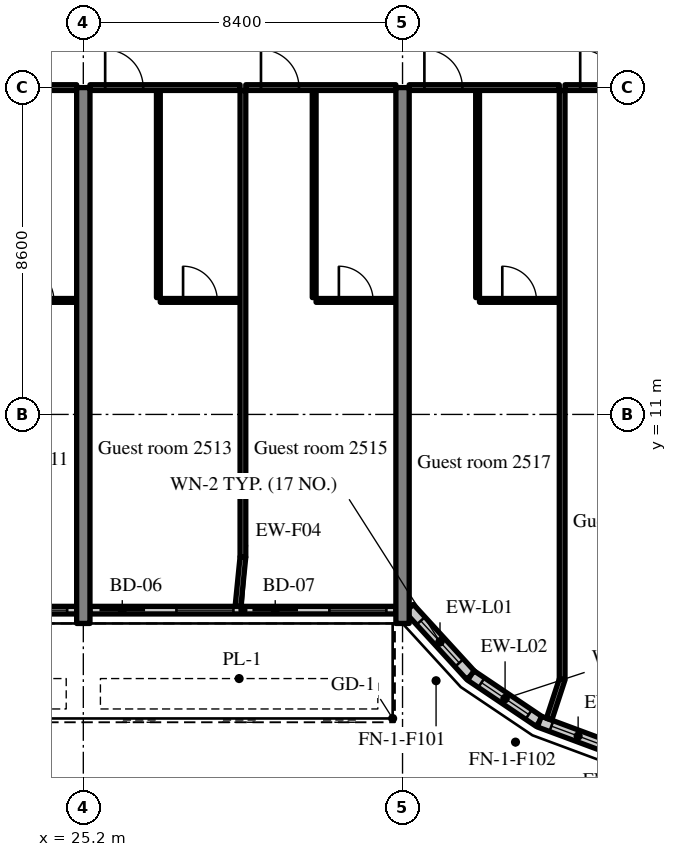
"""IFC4 building model, lengths in metres.
Left out: names, types, materials, properties, quantities, classifications, styles, units other than length and angle.
Written with IfcOpenShell. Run it as: python <this file> out.ifc"""

import sys

from ifc_helpers import new_model, si_unit, direction, frame, frame_2d, origin, place, context, subcontext, project, spatial, rectangle, extrude, source, transform, mapped, element, fill, save


model = new_model("IFC4")
c1 = context("Model", 3, precision=1e-05, world=origin(), true_north=direction((0.0, 1.0)))
c2 = subcontext(c1, "Body", "Model", "MODEL_VIEW")
j1 = project(units=[si_unit("LENGTHUNIT", "METRE"), si_unit("PLANEANGLEUNIT", "RADIAN")], contexts=[c1])
p1 = place(None, origin())
s1 = spatial("IfcSite", under=j1, at=p1, CompositionType="ELEMENT")
p2 = place(p1, origin())
s2 = spatial("IfcBuilding", under=s1, at=p2, CompositionType="ELEMENT")
p3 = place(p2, frame((0.0, 0.0, 106.6)))
s3 = spatial("IfcBuildingStorey", under=s2, at=p3, CompositionType="ELEMENT", Elevation=106.6)
m1 = source(origin(), c2, "Body", "SweptSolid", [
    extrude(rectangle(XDim=14.1, YDim=0.35, at=frame_2d((7.05, 0.0))), origin(), (0.0, 0.0, 1.0), 3.52),
])
for number, where, z_axis, x_axis in (
    (1, (25.2, 5.5, 0.0), (0.0, 0.0, 1.0), (0.0, 1.0, 0.0)),
    (2, (33.6, 5.5, 0.0), (0.0, 0.0, 1.0), (0.0, 1.0, 0.0)),
):
    element("IfcWall", number, at=place(p3, frame(where, z_axis=z_axis, x_axis=x_axis)), inside=s3, PredefinedType="SHEAR", context=c2, shape_type="MappedRepresentation", body=[
        mapped(m1, transform((0.0, 0.0, 0.0), scale=1.0)),
    ])
m2 = source(origin(), c2, "Body", "SweptSolid", [
    extrude(rectangle(XDim=8.05, YDim=0.2, at=frame_2d((4.025, 0.0))), origin(), (0.0, 0.0, 1.0), 2.82),
])
p4 = place(p3, frame((16.975, 5.85, 0.0), z_axis=(0.0, 0.0, 1.0), x_axis=(1.0, 0.0, 0.0)))
e3 = element("IfcWall", 3, at=p4, inside=s3, PredefinedType="SOLIDWALL", context=c2, shape_type="MappedRepresentation", body=[
    mapped(m2, transform((0.0, 0.0, 0.0), scale=1.0)),
])
m3 = source(origin(), c2, "Body", "SweptSolid", [
    extrude(rectangle(XDim=1.2, YDim=2.4, at=frame_2d((0.6, 1.2))), frame((0.0, 0.11, 0.0), z_axis=(0.0, -1.0, 0.0), x_axis=(1.0, 0.0, 0.0)), (0.0, 0.0, 1.0), 0.22),
])
p5 = place(p4, frame((0.25, 0.0, 0.0)))
e4 = element("IfcOpeningElement", 4, at=p5, cuts=e3, PredefinedType="OPENING", context=c2, shape_type="MappedRepresentation", body=[
    mapped(m3, transform((0.0, 0.0, 0.0), scale=1.0)),
])
m4 = source(origin(), c2, "Body", "SweptSolid", [
    extrude(rectangle(XDim=1.5, YDim=1.5, at=frame_2d((0.75, 0.75))), frame((0.0, 0.11, 0.0), z_axis=(0.0, -1.0, 0.0), x_axis=(1.0, 0.0, 0.0)), (0.0, 0.0, 1.0), 0.22),
])
p6 = place(p4, frame((2.275, 0.0, 0.9)))
e5 = element("IfcOpeningElement", 5, at=p6, cuts=e3, PredefinedType="OPENING", context=c2, shape_type="MappedRepresentation", body=[
    mapped(m4, transform((0.0, 0.0, 0.0), scale=1.0)),
])
p7 = place(p4, frame((4.275, 0.0, 0.0)))
e6 = element("IfcOpeningElement", 6, at=p7, cuts=e3, PredefinedType="OPENING", context=c2, shape_type="MappedRepresentation", body=[
    mapped(m3, transform((0.0, 0.0, 0.0), scale=1.0)),
])
p8 = place(p4, frame((6.3, 0.0, 0.9)))
e7 = element("IfcOpeningElement", 7, at=p8, cuts=e3, PredefinedType="OPENING", context=c2, shape_type="MappedRepresentation", body=[
    mapped(m4, transform((0.0, 0.0, 0.0), scale=1.0)),
])
m5 = source(origin(), c2, "Body", "SweptSolid", [
    extrude(rectangle(XDim=8.05, YDim=0.2, at=frame_2d((4.025, 0.0))), origin(), (0.0, 0.0, 1.0), 2.82),
])
p9 = place(p3, frame((25.375, 5.85, 0.0), z_axis=(0.0, 0.0, 1.0), x_axis=(1.0, 0.0, 0.0)))
e8 = element("IfcWall", 8, at=p9, inside=s3, PredefinedType="SOLIDWALL", context=c2, shape_type="MappedRepresentation", body=[
    mapped(m5, transform((0.0, 0.0, 0.0), scale=1.0)),
])
p10 = place(p9, frame((0.25, 0.0, 0.0)))
e9 = element("IfcOpeningElement", 9, at=p10, cuts=e8, PredefinedType="OPENING", context=c2, shape_type="MappedRepresentation", body=[
    mapped(m3, transform((0.0, 0.0, 0.0), scale=1.0)),
])
p11 = place(p9, frame((2.275, 0.0, 0.9)))
e10 = element("IfcOpeningElement", 10, at=p11, cuts=e8, PredefinedType="OPENING", context=c2, shape_type="MappedRepresentation", body=[
    mapped(m4, transform((0.0, 0.0, 0.0), scale=1.0)),
])
p12 = place(p9, frame((4.275, 0.0, 0.0)))
e11 = element("IfcOpeningElement", 11, at=p12, cuts=e8, PredefinedType="OPENING", context=c2, shape_type="MappedRepresentation", body=[
    mapped(m3, transform((0.0, 0.0, 0.0), scale=1.0)),
])
p13 = place(p9, frame((6.3, 0.0, 0.9)))
e12 = element("IfcOpeningElement", 12, at=p13, cuts=e8, PredefinedType="OPENING", context=c2, shape_type="MappedRepresentation", body=[
    mapped(m4, transform((0.0, 0.0, 0.0), scale=1.0)),
])
m6 = source(origin(), c2, "Body", "SweptSolid", [
    extrude(rectangle(XDim=2.398, YDim=0.3, at=frame_2d((1.199, 0.0))), origin(), (0.0, 0.0, 1.0), 3.52),
])
p14 = place(p3, frame((33.776, 5.9, 0.0), z_axis=(0.0, 0.0, 1.0), x_axis=(0.675374189419, -0.737475222815, 0.0)))
e13 = element("IfcWall", 13, at=p14, inside=s3, PredefinedType="SOLIDWALL", context=c2, shape_type="MappedRepresentation", body=[
    mapped(m6, transform((0.0, 0.0, 0.0), scale=1.0)),
])
m7 = source(origin(), c2, "Body", "SweptSolid", [
    extrude(rectangle(XDim=1.5, YDim=2.0, at=frame_2d((0.75, 1.0))), frame((0.0, 0.16, 0.0), z_axis=(0.0, -1.0, 0.0), x_axis=(1.0, 0.0, 0.0)), (0.0, 0.0, 1.0), 0.32),
])
p15 = place(p14, frame((0.449, 0.0, 0.9)))
e14 = element("IfcOpeningElement", 14, at=p15, cuts=e13, PredefinedType="OPENING", context=c2, shape_type="MappedRepresentation", body=[
    mapped(m7, transform((0.0, 0.0, 0.0), scale=1.0)),
])
m8 = source(origin(), c2, "Body", "SweptSolid", [
    extrude(rectangle(XDim=2.176, YDim=0.3, at=frame_2d((1.088, 0.0))), origin(), (0.0, 0.0, 1.0), 3.52),
])
p16 = place(p3, frame((35.396, 4.131, 0.0), z_axis=(0.0, 0.0, 1.0), x_axis=(0.829590746428, -0.558371913192, 0.0)))
e15 = element("IfcWall", 15, at=p16, inside=s3, PredefinedType="SOLIDWALL", context=c2, shape_type="MappedRepresentation", body=[
    mapped(m8, transform((0.0, 0.0, 0.0), scale=1.0)),
])
p17 = place(p16, frame((0.338, 0.0, 0.9)))
e16 = element("IfcOpeningElement", 16, at=p17, cuts=e15, PredefinedType="OPENING", context=c2, shape_type="MappedRepresentation", body=[
    mapped(m7, transform((0.0, 0.0, 0.0), scale=1.0)),
])
p18 = place(p3, frame((37.201, 2.917, 0.0), z_axis=(0.0, 0.0, 1.0), x_axis=(0.93754555999, -0.347862505801, 0.0)))
e17 = element("IfcWall", 17, at=p18, inside=s3, PredefinedType="SOLIDWALL", context=c2, shape_type="MappedRepresentation", body=[
    mapped(m8, transform((0.0, 0.0, 0.0), scale=1.0)),
])
p19 = place(p18, frame((0.338, 0.0, 0.9)))
e18 = element("IfcOpeningElement", 18, at=p19, cuts=e17, PredefinedType="OPENING", context=c2, shape_type="MappedRepresentation", body=[
    mapped(m7, transform((0.0, 0.0, 0.0), scale=1.0)),
])
m9 = source(origin(), c2, "Body", "SweptSolid", [
    extrude(rectangle(XDim=2.1, YDim=0.1, at=frame_2d((1.05, 0.0))), origin(), (0.0, 0.0, 1.0), 3.52),
])
p20 = place(p3, frame((22.925, 14.0, 0.0), z_axis=(0.0, 0.0, 1.0), x_axis=(1.0, 0.0, 0.0)))
e19 = element("IfcWall", 19, at=p20, inside=s3, PredefinedType="PARTITIONING", context=c2, shape_type="MappedRepresentation", body=[
    mapped(m9, transform((0.0, 0.0, 0.0), scale=1.0)),
])
m10 = source(origin(), c2, "Body", "SweptSolid", [
    extrude(rectangle(XDim=0.9, YDim=2.1, at=frame_2d((0.45, 1.05))), frame((0.0, 0.06, 0.0), z_axis=(0.0, -1.0, 0.0), x_axis=(1.0, 0.0, 0.0)), (0.0, 0.0, 1.0), 0.12),
])
p21 = place(p20, frame((0.6, 0.0, 0.0)))
e20 = element("IfcOpeningElement", 20, at=p21, cuts=e19, PredefinedType="OPENING", context=c2, shape_type="MappedRepresentation", body=[
    mapped(m10, transform((0.0, 0.0, 0.0), scale=1.0)),
])
m11 = source(origin(), c2, "Body", "SweptSolid", [
    extrude(rectangle(XDim=3.95, YDim=0.15, at=frame_2d((1.975, 0.0))), origin(), (0.0, 0.0, 1.0), 2.82),
])
p22 = place(p3, frame((21.075, 19.6, 0.0), z_axis=(0.0, 0.0, 1.0), x_axis=(1.0, 0.0, 0.0)))
e21 = element("IfcWall", 21, at=p22, inside=s3, PredefinedType="PARTITIONING", context=c2, shape_type="MappedRepresentation", body=[
    mapped(m11, transform((0.0, 0.0, 0.0), scale=1.0)),
])
m12 = source(origin(), c2, "Body", "SweptSolid", [
    extrude(rectangle(XDim=1.0, YDim=2.1, at=frame_2d((0.5, 1.05))), frame((0.0, 0.085, 0.0), z_axis=(0.0, -1.0, 0.0), x_axis=(1.0, 0.0, 0.0)), (0.0, 0.0, 1.0), 0.17),
])
p23 = place(p22, frame((0.4, 0.0, 0.0)))
e22 = element("IfcOpeningElement", 22, at=p23, cuts=e21, PredefinedType="OPENING", context=c2, shape_type="MappedRepresentation", body=[
    mapped(m12, transform((0.0, 0.0, 0.0), scale=1.0)),
])
m13 = source(origin(), c2, "Body", "SweptSolid", [
    extrude(rectangle(XDim=5.45, YDim=0.1, at=frame_2d((2.725, 0.0))), origin(), (0.0, 0.0, 1.0), 3.52),
])
p24 = place(p3, frame((27.175, 14.075, 0.0), z_axis=(0.0, 0.0, 1.0), x_axis=(0.0, 1.0, 0.0)))
e23 = element("IfcWall", 23, at=p24, inside=s3, PredefinedType="PARTITIONING", context=c2, shape_type="MappedRepresentation", body=[
    mapped(m13, transform((0.0, 0.0, 0.0), scale=1.0)),
])
p25 = place(p3, frame((27.225, 14.0, 0.0), z_axis=(0.0, 0.0, 1.0), x_axis=(1.0, 0.0, 0.0)))
e24 = element("IfcWall", 24, at=p25, inside=s3, PredefinedType="PARTITIONING", context=c2, shape_type="MappedRepresentation", body=[
    mapped(m9, transform((0.0, 0.0, 0.0), scale=1.0)),
])
p26 = place(p25, frame((0.6, 0.0, 0.0)))
e25 = element("IfcOpeningElement", 25, at=p26, cuts=e24, PredefinedType="OPENING", context=c2, shape_type="MappedRepresentation", body=[
    mapped(m10, transform((0.0, 0.0, 0.0), scale=1.0)),
])
p27 = place(p3, frame((25.375, 19.6, 0.0), z_axis=(0.0, 0.0, 1.0), x_axis=(1.0, 0.0, 0.0)))
e26 = element("IfcWall", 26, at=p27, inside=s3, PredefinedType="PARTITIONING", context=c2, shape_type="MappedRepresentation", body=[
    mapped(m11, transform((0.0, 0.0, 0.0), scale=1.0)),
])
p28 = place(p27, frame((0.4, 0.0, 0.0)))
e27 = element("IfcOpeningElement", 27, at=p28, cuts=e26, PredefinedType="OPENING", context=c2, shape_type="MappedRepresentation", body=[
    mapped(m12, transform((0.0, 0.0, 0.0), scale=1.0)),
])
p29 = place(p3, frame((31.275, 14.075, 0.0), z_axis=(0.0, 0.0, 1.0), x_axis=(0.0, 1.0, 0.0)))
e28 = element("IfcWall", 28, at=p29, inside=s3, PredefinedType="PARTITIONING", context=c2, shape_type="MappedRepresentation", body=[
    mapped(m13, transform((0.0, 0.0, 0.0), scale=1.0)),
])
m14 = source(origin(), c2, "Body", "SweptSolid", [
    extrude(rectangle(XDim=2.1, YDim=0.1, at=frame_2d((1.05, 0.0))), origin(), (0.0, 0.0, 1.0), 3.52),
])
p30 = place(p3, frame((31.325, 14.0, 0.0), z_axis=(0.0, 0.0, 1.0), x_axis=(1.0, 0.0, 0.0)))
e29 = element("IfcWall", 29, at=p30, inside=s3, PredefinedType="PARTITIONING", context=c2, shape_type="MappedRepresentation", body=[
    mapped(m14, transform((0.0, 0.0, 0.0), scale=1.0)),
])
p31 = place(p30, frame((0.6, 0.0, 0.0)))
e30 = element("IfcOpeningElement", 30, at=p31, cuts=e29, PredefinedType="OPENING", context=c2, shape_type="MappedRepresentation", body=[
    mapped(m10, transform((0.0, 0.0, 0.0), scale=1.0)),
])
p32 = place(p3, frame((29.475, 19.6, 0.0), z_axis=(0.0, 0.0, 1.0), x_axis=(1.0, 0.0, 0.0)))
e31 = element("IfcWall", 31, at=p32, inside=s3, PredefinedType="PARTITIONING", context=c2, shape_type="MappedRepresentation", body=[
    mapped(m11, transform((0.0, 0.0, 0.0), scale=1.0)),
])
p33 = place(p32, frame((0.4, 0.0, 0.0)))
e32 = element("IfcOpeningElement", 32, at=p33, cuts=e31, PredefinedType="OPENING", context=c2, shape_type="MappedRepresentation", body=[
    mapped(m12, transform((0.0, 0.0, 0.0), scale=1.0)),
])
m15 = source(origin(), c2, "Body", "SweptSolid", [
    extrude(rectangle(XDim=12.275, YDim=0.15, at=frame_2d((6.137, 0.0))), origin(), (0.0, 0.0, 1.0), 3.52),
])
p34 = place(p3, frame((29.4, 7.25, 0.0), z_axis=(0.0, 0.0, 1.0), x_axis=(0.0, 1.0, 0.0)))
e33 = element("IfcWall", 33, at=p34, inside=s3, PredefinedType="PARTITIONING", context=c2, shape_type="MappedRepresentation", body=[
    mapped(m15, transform((0.0, 0.0, 0.0), scale=1.0)),
])
p35 = place(p3, frame((35.575, 14.075, 0.0), z_axis=(0.0, 0.0, 1.0), x_axis=(0.0, 1.0, 0.0)))
e34 = element("IfcWall", 34, at=p35, inside=s3, PredefinedType="PARTITIONING", context=c2, shape_type="MappedRepresentation", body=[
    mapped(m13, transform((0.0, 0.0, 0.0), scale=1.0)),
])
p36 = place(p3, frame((35.625, 14.0, 0.0), z_axis=(0.0, 0.0, 1.0), x_axis=(1.0, 0.0, 0.0)))
e35 = element("IfcWall", 35, at=p36, inside=s3, PredefinedType="PARTITIONING", context=c2, shape_type="MappedRepresentation", body=[
    mapped(m14, transform((0.0, 0.0, 0.0), scale=1.0)),
])
p37 = place(p36, frame((0.6, 0.0, 0.0)))
e36 = element("IfcOpeningElement", 36, at=p37, cuts=e35, PredefinedType="OPENING", context=c2, shape_type="MappedRepresentation", body=[
    mapped(m10, transform((0.0, 0.0, 0.0), scale=1.0)),
])
m16 = source(origin(), c2, "Body", "SweptSolid", [
    extrude(rectangle(XDim=3.95, YDim=0.15, at=frame_2d((1.975, 0.0))), origin(), (0.0, 0.0, 1.0), 2.82),
])
p38 = place(p3, frame((33.775, 19.6, 0.0), z_axis=(0.0, 0.0, 1.0), x_axis=(1.0, 0.0, 0.0)))
e37 = element("IfcWall", 37, at=p38, inside=s3, PredefinedType="PARTITIONING", context=c2, shape_type="MappedRepresentation", body=[
    mapped(m16, transform((0.0, 0.0, 0.0), scale=1.0)),
])
p39 = place(p38, frame((0.4, 0.0, 0.0)))
e38 = element("IfcOpeningElement", 38, at=p39, cuts=e37, PredefinedType="OPENING", context=c2, shape_type="MappedRepresentation", body=[
    mapped(m12, transform((0.0, 0.0, 0.0), scale=1.0)),
])
p40 = place(p3, frame((37.875, 19.6, 0.0), z_axis=(0.0, 0.0, 1.0), x_axis=(1.0, 0.0, 0.0)))
e39 = element("IfcWall", 39, at=p40, inside=s3, PredefinedType="PARTITIONING", context=c2, shape_type="MappedRepresentation", body=[
    mapped(m11, transform((0.0, 0.0, 0.0), scale=1.0)),
])
p41 = place(p40, frame((0.4, 0.0, 0.0)))
e40 = element("IfcOpeningElement", 40, at=p41, cuts=e39, PredefinedType="OPENING", context=c2, shape_type="MappedRepresentation", body=[
    mapped(m12, transform((0.0, 0.0, 0.0), scale=1.0)),
])
m17 = source(origin(), c2, "Body", "SweptSolid", [
    extrude(rectangle(XDim=15.498, YDim=0.15, at=frame_2d((7.749, 0.0))), origin(), (0.0, 0.0, 1.0), 3.52),
])
p42 = place(p3, frame((37.8, 4.027, 0.0), z_axis=(0.0, 0.0, 1.0), x_axis=(0.0, 1.0, 0.0)))
e41 = element("IfcWall", 41, at=p42, inside=s3, PredefinedType="PARTITIONING", context=c2, shape_type="MappedRepresentation", body=[
    mapped(m17, transform((0.0, 0.0, 0.0), scale=1.0)),
])
m18 = source(origin(), c2, "Body", "SweptSolid", [
    extrude(rectangle(XDim=1.307, YDim=0.15, at=frame_2d((0.653, 0.0))), origin(), (0.0, 0.0, 1.0), 3.52),
])
p43 = place(p3, frame((29.27, 5.95, 0.0), z_axis=(0.0, 0.0, 1.0), x_axis=(0.099411212066, 0.995046436562, 0.0)))
e42 = element("IfcWall", 42, at=p43, inside=s3, PredefinedType="PARTITIONING", context=c2, shape_type="MappedRepresentation", body=[
    mapped(m18, transform((0.0, 0.0, 0.0), scale=1.0)),
])
m19 = source(origin(), c2, "Body", "SweptSolid", [
    extrude(rectangle(XDim=1.101, YDim=0.15, at=frame_2d((0.55, 0.0))), origin(), (0.0, 0.0, 1.0), 3.52),
])
p44 = place(p3, frame((37.457, 2.981, 0.0), z_axis=(0.0, 0.0, 1.0), x_axis=(0.311567081539, 0.950224159712, 0.0)))
e43 = element("IfcWall", 43, at=p44, inside=s3, PredefinedType="PARTITIONING", context=c2, shape_type="MappedRepresentation", body=[
    mapped(m19, transform((0.0, 0.0, 0.0), scale=1.0)),
])
m20 = source(origin(), c2, "Body", "SweptSolid", [
    extrude(rectangle(XDim=1.5, YDim=1.5, at=frame_2d((0.75, 0.75))), frame((0.0, 0.03, 0.0), z_axis=(0.0, -1.0, 0.0), x_axis=(1.0, 0.0, 0.0)), (0.0, 0.0, 1.0), 0.06),
])
p45 = place(p8, origin())
e44 = element("IfcWindow", 44, at=p45, inside=s3, PartitioningType="SINGLE_PANEL", PredefinedType="WINDOW", context=c2, shape_type="MappedRepresentation", body=[
    mapped(m20, transform((0.0, 0.0, 0.0), scale=1.0)),
])
fill(e7, e44)
m21 = source(origin(), c2, "Body", "SweptSolid", [
    extrude(rectangle(XDim=1.2, YDim=2.4, at=frame_2d((0.6, 1.2))), frame((0.0, 0.025, 0.0), z_axis=(0.0, -1.0, 0.0), x_axis=(1.0, 0.0, 0.0)), (0.0, 0.0, 1.0), 0.05),
])
p46 = place(p10, origin())
e45 = element("IfcDoor", 45, at=p46, inside=s3, OperationType="SLIDING_TO_RIGHT", PredefinedType="DOOR", context=c2, shape_type="MappedRepresentation", body=[
    mapped(m21, transform((0.0, 0.0, 0.0), scale=1.0)),
])
fill(e9, e45)
p47 = place(p11, origin())
e46 = element("IfcWindow", 46, at=p47, inside=s3, PartitioningType="SINGLE_PANEL", PredefinedType="WINDOW", context=c2, shape_type="MappedRepresentation", body=[
    mapped(m20, transform((0.0, 0.0, 0.0), scale=1.0)),
])
fill(e10, e46)
p48 = place(p12, origin())
e47 = element("IfcDoor", 47, at=p48, inside=s3, OperationType="SLIDING_TO_LEFT", PredefinedType="DOOR", context=c2, shape_type="MappedRepresentation", body=[
    mapped(m21, transform((0.0, 0.0, 0.0), scale=1.0)),
])
fill(e11, e47)
p49 = place(p13, origin())
e48 = element("IfcWindow", 48, at=p49, inside=s3, PartitioningType="SINGLE_PANEL", PredefinedType="WINDOW", context=c2, shape_type="MappedRepresentation", body=[
    mapped(m20, transform((0.0, 0.0, 0.0), scale=1.0)),
])
fill(e12, e48)
m22 = source(origin(), c2, "Body", "SweptSolid", [
    extrude(rectangle(XDim=1.5, YDim=2.0, at=frame_2d((0.75, 1.0))), frame((0.0, 0.03, 0.0), z_axis=(0.0, -1.0, 0.0), x_axis=(1.0, 0.0, 0.0)), (0.0, 0.0, 1.0), 0.06),
])
p50 = place(p15, origin())
e49 = element("IfcWindow", 49, at=p50, inside=s3, PartitioningType="SINGLE_PANEL", PredefinedType="WINDOW", context=c2, shape_type="MappedRepresentation", body=[
    mapped(m22, transform((0.0, 0.0, 0.0), scale=1.0)),
])
fill(e14, e49)
p51 = place(p17, origin())
e50 = element("IfcWindow", 50, at=p51, inside=s3, PartitioningType="SINGLE_PANEL", PredefinedType="WINDOW", context=c2, shape_type="MappedRepresentation", body=[
    mapped(m22, transform((0.0, 0.0, 0.0), scale=1.0)),
])
fill(e16, e50)
p52 = place(p19, origin())
e51 = element("IfcWindow", 51, at=p52, inside=s3, PartitioningType="SINGLE_PANEL", PredefinedType="WINDOW", context=c2, shape_type="MappedRepresentation", body=[
    mapped(m22, transform((0.0, 0.0, 0.0), scale=1.0)),
])
fill(e18, e51)
m23 = source(origin(), c2, "Body", "SweptSolid", [
    extrude(rectangle(XDim=0.9, YDim=2.1, at=frame_2d((0.45, 1.05))), frame((0.0, 0.025, 0.0), z_axis=(0.0, -1.0, 0.0), x_axis=(1.0, 0.0, 0.0)), (0.0, 0.0, 1.0), 0.05),
])
p53 = place(p21, origin())
e52 = element("IfcDoor", 52, at=p53, inside=s3, OperationType="SINGLE_SWING_LEFT", PredefinedType="DOOR", context=c2, shape_type="MappedRepresentation", body=[
    mapped(m23, transform((0.0, 0.0, 0.0), scale=1.0)),
])
fill(e20, e52)
p54 = place(p26, origin())
e53 = element("IfcDoor", 53, at=p54, inside=s3, OperationType="SINGLE_SWING_LEFT", PredefinedType="DOOR", context=c2, shape_type="MappedRepresentation", body=[
    mapped(m23, transform((0.0, 0.0, 0.0), scale=1.0)),
])
fill(e25, e53)
m24 = source(origin(), c2, "Body", "SweptSolid", [
    extrude(rectangle(XDim=1.0, YDim=2.1, at=frame_2d((0.5, 1.05))), frame((0.0, 0.025, 0.0), z_axis=(0.0, -1.0, 0.0), x_axis=(1.0, 0.0, 0.0)), (0.0, 0.0, 1.0), 0.05),
])
p55 = place(p28, origin())
e54 = element("IfcDoor", 54, at=p55, inside=s3, OperationType="SINGLE_SWING_LEFT", PredefinedType="DOOR", context=c2, shape_type="MappedRepresentation", body=[
    mapped(m24, transform((0.0, 0.0, 0.0), scale=1.0)),
])
fill(e27, e54)
p56 = place(p31, origin())
e55 = element("IfcDoor", 55, at=p56, inside=s3, OperationType="SINGLE_SWING_LEFT", PredefinedType="DOOR", context=c2, shape_type="MappedRepresentation", body=[
    mapped(m23, transform((0.0, 0.0, 0.0), scale=1.0)),
])
fill(e30, e55)
p57 = place(p33, origin())
e56 = element("IfcDoor", 56, at=p57, inside=s3, OperationType="SINGLE_SWING_LEFT", PredefinedType="DOOR", context=c2, shape_type="MappedRepresentation", body=[
    mapped(m24, transform((0.0, 0.0, 0.0), scale=1.0)),
])
fill(e32, e56)
p58 = place(p37, origin())
e57 = element("IfcDoor", 57, at=p58, inside=s3, OperationType="SINGLE_SWING_LEFT", PredefinedType="DOOR", context=c2, shape_type="MappedRepresentation", body=[
    mapped(m23, transform((0.0, 0.0, 0.0), scale=1.0)),
])
fill(e36, e57)
p59 = place(p39, origin())
e58 = element("IfcDoor", 58, at=p59, inside=s3, OperationType="SINGLE_SWING_LEFT", PredefinedType="DOOR", context=c2, shape_type="MappedRepresentation", body=[
    mapped(m24, transform((0.0, 0.0, 0.0), scale=1.0)),
])
fill(e38, e58)
p60 = place(p41, origin())
e59 = element("IfcDoor", 59, at=p60, inside=s3, OperationType="SINGLE_SWING_LEFT", PredefinedType="DOOR", context=c2, shape_type="MappedRepresentation", body=[
    mapped(m24, transform((0.0, 0.0, 0.0), scale=1.0)),
])
fill(e40, e59)
save(model, sys.argv[1])
